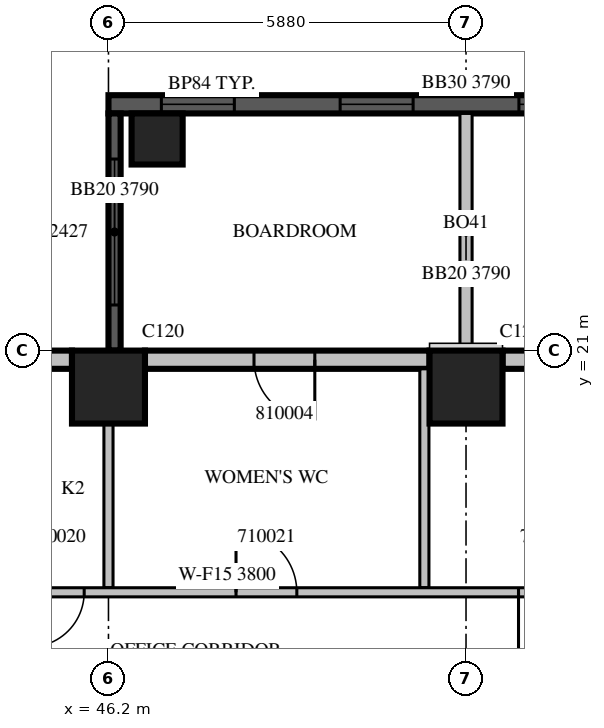
"""IFC4 building model, lengths in metres.
Left out: names, types, materials, properties, quantities, classifications, styles, units other than length and angle.
Written with IfcOpenShell. Run it as: python <this file> out.ifc"""

import sys

from ifc_helpers import new_model, si_unit, direction, frame, frame_2d, origin, origin_2d, place, context, subcontext, project, spatial, rectangle, extrude, source, transform, mapped, element, fill, save


model = new_model("IFC4")
c1 = context("Model", 3, precision=1e-05, world=origin(), true_north=direction((0.0, 1.0)))
c2 = subcontext(c1, "Body", "Model", "MODEL_VIEW")
j1 = project(units=[si_unit("LENGTHUNIT", "METRE"), si_unit("PLANEANGLEUNIT", "RADIAN")], contexts=[c1])
p1 = place(None, origin())
s1 = spatial("IfcSite", under=j1, at=p1, CompositionType="ELEMENT")
p2 = place(p1, origin())
s2 = spatial("IfcBuilding", under=s1, at=p2, CompositionType="ELEMENT")
p3 = place(p2, frame((0.0, 0.0, 53.1)))
s3 = spatial("IfcBuildingStorey", under=s2, at=p3, CompositionType="ELEMENT", Elevation=53.1)
m1 = source(origin(), c2, "Body", "SweptSolid", [
    extrude(rectangle(XDim=1.2, YDim=1.2, at=origin_2d()), origin(), (0.0, 0.0, 1.0), 4.2),
])
for number, where, z_axis, x_axis in (
    (1, (46.2, 20.4, 0.0), (0.0, 0.0, 1.0), (1.0, 0.0, 0.0)),
    (2, (52.08, 20.4, 0.0), (0.0, 0.0, 1.0), (1.0, 0.0, 0.0)),
):
    element("IfcColumn", number, at=place(p3, frame(where, z_axis=z_axis, x_axis=x_axis)), inside=s3, PredefinedType="COLUMN", context=c2, shape_type="MappedRepresentation", body=[
        mapped(m1, transform((0.0, 0.0, 0.0), scale=1.0)),
    ])
p4 = place(p3, frame((47.0, 24.48, 0.0), z_axis=(0.0, 0.0, 1.0), x_axis=(1.0, 0.0, 0.0)))
e3 = element("IfcColumn", 3, at=p4, inside=s3, PredefinedType="COLUMN", context=c2, shape_type="SweptSolid", body=[
    extrude(rectangle(XDim=0.84, YDim=0.84, at=origin_2d()), origin(), (0.0, 0.0, 1.0), 4.2),
])
m2 = source(origin(), c2, "Body", "SweptSolid", [
    extrude(rectangle(XDim=11.76, YDim=0.3, at=frame_2d((5.88, 0.0))), origin(), (0.0, 0.0, 1.0), 3.79),
])
p5 = place(p3, frame((57.96, 25.05, 0.0), z_axis=(0.0, 0.0, 1.0), x_axis=(-1.0, 0.0, 0.0)))
e4 = element("IfcWall", 4, at=p5, inside=s3, PredefinedType="SOLIDWALL", context=c2, shape_type="MappedRepresentation", body=[
    mapped(m2, transform((0.0, 0.0, 0.0), scale=1.0)),
])
m3 = source(origin(), c2, "Body", "SweptSolid", [
    extrude(rectangle(XDim=1.2, YDim=2.7, at=frame_2d((0.6, 1.35))), frame((0.0, 0.16, 0.0), z_axis=(0.0, -1.0, 0.0), x_axis=(1.0, 0.0, 0.0)), (0.0, 0.0, 1.0), 0.32),
])
p6 = place(p5, frame((0.87, 0.0, 0.6)))
e5 = element("IfcOpeningElement", 5, at=p6, cuts=e4, PredefinedType="OPENING", context=c2, shape_type="MappedRepresentation", body=[
    mapped(m3, transform((0.0, 0.0, 0.0), scale=1.0)),
])
p7 = place(p5, frame((3.81, 0.0, 0.6)))
e6 = element("IfcOpeningElement", 6, at=p7, cuts=e4, PredefinedType="OPENING", context=c2, shape_type="MappedRepresentation", body=[
    mapped(m3, transform((0.0, 0.0, 0.0), scale=1.0)),
])
p8 = place(p5, frame((6.75, 0.0, 0.6)))
e7 = element("IfcOpeningElement", 7, at=p8, cuts=e4, PredefinedType="OPENING", context=c2, shape_type="MappedRepresentation", body=[
    mapped(m3, transform((0.0, 0.0, 0.0), scale=1.0)),
])
p9 = place(p5, frame((9.69, 0.0, 0.6)))
e8 = element("IfcOpeningElement", 8, at=p9, cuts=e4, PredefinedType="OPENING", context=c2, shape_type="MappedRepresentation", body=[
    mapped(m3, transform((0.0, 0.0, 0.0), scale=1.0)),
])
m4 = source(origin(), c2, "Body", "SweptSolid", [
    extrude(rectangle(XDim=3.9, YDim=0.2, at=frame_2d((1.95, 0.0))), origin(), (0.0, 0.0, 1.0), 3.79),
])
p10 = place(p3, frame((52.08, 21.0, 0.0), z_axis=(0.0, 0.0, 1.0), x_axis=(0.0, 1.0, 0.0)))
e9 = element("IfcWall", 9, at=p10, inside=s3, PredefinedType="SOLIDWALL", context=c2, shape_type="MappedRepresentation", body=[
    mapped(m4, transform((0.0, 0.0, 0.0), scale=1.0)),
])
m5 = source(origin(), c2, "Body", "SweptSolid", [
    extrude(rectangle(XDim=3.9, YDim=0.2, at=frame_2d((1.95, 0.0))), origin(), (0.0, 0.0, 1.0), 3.79),
])
p11 = place(p3, frame((46.3, 21.0, 0.0), z_axis=(0.0, 0.0, 1.0), x_axis=(0.0, 1.0, 0.0)))
e10 = element("IfcWall", 10, at=p11, inside=s3, PredefinedType="SOLIDWALL", context=c2, shape_type="MappedRepresentation", body=[
    mapped(m5, transform((0.0, 0.0, 0.0), scale=1.0)),
])
m6 = source(origin(), c2, "Body", "SweptSolid", [
    extrude(rectangle(XDim=2.4, YDim=2.7, at=frame_2d((1.2, 1.35))), frame((0.0, 0.11, 0.0), z_axis=(0.0, -1.0, 0.0), x_axis=(1.0, 0.0, 0.0)), (0.0, 0.0, 1.0), 0.22),
])
p12 = place(p11, frame((0.75, 0.0, 0.6)))
e11 = element("IfcOpeningElement", 11, at=p12, cuts=e10, PredefinedType="OPENING", context=c2, shape_type="MappedRepresentation", body=[
    mapped(m6, transform((0.0, 0.0, 0.0), scale=1.0)),
])
m7 = source(origin(), c2, "Body", "SweptSolid", [
    extrude(rectangle(XDim=4.68, YDim=0.3, at=frame_2d((2.34, 0.0))), origin(), (0.0, 0.0, 1.0), 3.8),
])
p13 = place(p3, frame((57.36, 20.85, 0.0), z_axis=(0.0, 0.0, 1.0), x_axis=(-1.0, 0.0, 0.0)))
e12 = element("IfcWall", 12, at=p13, inside=s3, PredefinedType="STANDARD", context=c2, shape_type="MappedRepresentation", body=[
    mapped(m7, transform((0.0, 0.0, 0.0), scale=1.0)),
])
m8 = source(origin(), c2, "Body", "SweptSolid", [
    extrude(rectangle(XDim=1.0, YDim=2.1, at=frame_2d((0.5, 1.05))), frame((0.0, 0.16, 0.0), z_axis=(0.0, -1.0, 0.0), x_axis=(1.0, 0.0, 0.0)), (0.0, 0.0, 1.0), 0.32),
])
p14 = place(p13, frame((3.287, 0.0, 0.0)))
e13 = element("IfcOpeningElement", 13, at=p14, cuts=e12, PredefinedType="OPENING", context=c2, shape_type="MappedRepresentation", body=[
    mapped(m8, transform((0.0, 0.0, 0.0), scale=1.0)),
])
p15 = place(p3, frame((51.48, 20.85, 0.0), z_axis=(0.0, 0.0, 1.0), x_axis=(-1.0, 0.0, 0.0)))
e14 = element("IfcWall", 14, at=p15, inside=s3, PredefinedType="STANDARD", context=c2, shape_type="MappedRepresentation", body=[
    mapped(m7, transform((0.0, 0.0, 0.0), scale=1.0)),
])
p16 = place(p15, frame((1.887, 0.0, 0.0)))
e15 = element("IfcOpeningElement", 15, at=p16, cuts=e14, PredefinedType="OPENING", context=c2, shape_type="MappedRepresentation", body=[
    mapped(m8, transform((0.0, 0.0, 0.0), scale=1.0)),
])
m9 = source(origin(), c2, "Body", "SweptSolid", [
    extrude(rectangle(XDim=7.2, YDim=0.3, at=frame_2d((3.6, 0.0))), origin(), (0.0, 0.0, 1.0), 3.8),
])
p17 = place(p3, frame((45.6, 20.85, 0.0), z_axis=(0.0, 0.0, 1.0), x_axis=(-1.0, 0.0, 0.0)))
e16 = element("IfcWall", 16, at=p17, inside=s3, PredefinedType="STANDARD", context=c2, shape_type="MappedRepresentation", body=[
    mapped(m9, transform((0.0, 0.0, 0.0), scale=1.0)),
])
m10 = source(origin(), c2, "Body", "SweptSolid", [
    extrude(rectangle(XDim=1.8, YDim=2.7, at=frame_2d((0.9, 1.35))), frame((0.0, 0.16, 0.0), z_axis=(0.0, -1.0, 0.0), x_axis=(1.0, 0.0, 0.0)), (0.0, 0.0, 1.0), 0.32),
])
p18 = place(p17, frame((1.45, 0.0, 0.6)))
e17 = element("IfcOpeningElement", 17, at=p18, cuts=e16, PredefinedType="OPENING", context=c2, shape_type="MappedRepresentation", body=[
    mapped(m10, transform((0.0, 0.0, 0.0), scale=1.0)),
])
m11 = source(origin(), c2, "Body", "SweptSolid", [
    extrude(rectangle(XDim=2.4, YDim=2.7, at=frame_2d((1.2, 1.35))), frame((0.0, 0.16, 0.0), z_axis=(0.0, -1.0, 0.0), x_axis=(1.0, 0.0, 0.0)), (0.0, 0.0, 1.0), 0.32),
])
p19 = place(p17, frame((4.138, 0.0, 0.6)))
e18 = element("IfcOpeningElement", 18, at=p19, cuts=e16, PredefinedType="OPENING", context=c2, shape_type="MappedRepresentation", body=[
    mapped(m11, transform((0.0, 0.0, 0.0), scale=1.0)),
])
m12 = source(origin(), c2, "Body", "SweptSolid", [
    extrude(rectangle(XDim=3.6, YDim=0.15, at=frame_2d((1.8, 0.0))), origin(), (0.0, 0.0, 1.0), 3.8),
])
p20 = place(p3, frame((51.395, 20.7, 0.0), z_axis=(0.0, 0.0, 1.0), x_axis=(0.0, -1.0, 0.0)))
e19 = element("IfcWall", 19, at=p20, inside=s3, PredefinedType="PARTITIONING", context=c2, shape_type="MappedRepresentation", body=[
    mapped(m12, transform((0.0, 0.0, 0.0), scale=1.0)),
])
m13 = source(origin(), c2, "Body", "SweptSolid", [
    extrude(rectangle(XDim=2.701, YDim=0.15, at=frame_2d((1.351, 0.0))), origin(), (0.0, 0.0, 1.0), 3.8),
])
p21 = place(p3, frame((46.2, 17.1, 0.0), z_axis=(0.0, 0.0, 1.0), x_axis=(0.0, 1.0, 0.0)))
e20 = element("IfcWall", 20, at=p21, inside=s3, PredefinedType="PARTITIONING", context=c2, shape_type="MappedRepresentation", body=[
    mapped(m13, transform((0.0, 0.0, 0.0), scale=1.0)),
])
m14 = source(origin(), c2, "Body", "SweptSolid", [
    extrude(rectangle(XDim=37.5, YDim=0.15, at=frame_2d((18.75, 0.0))), origin(), (0.0, 0.0, 1.0), 3.8),
])
p22 = place(p3, frame((29.4, 17.025, 0.0), z_axis=(0.0, 0.0, 1.0), x_axis=(1.0, 0.0, 0.0)))
e21 = element("IfcWall", 21, at=p22, inside=s3, PredefinedType="PARTITIONING", context=c2, shape_type="MappedRepresentation", body=[
    mapped(m14, transform((0.0, 0.0, 0.0), scale=1.0)),
])
m15 = source(origin(), c2, "Body", "SweptSolid", [
    extrude(rectangle(XDim=1.0, YDim=2.1, at=frame_2d((0.5, 1.05))), frame((0.0, 0.085, 0.0), z_axis=(0.0, -1.0, 0.0), x_axis=(1.0, 0.0, 0.0)), (0.0, 0.0, 1.0), 0.17),
])
p23 = place(p22, frame((1.357, 0.0, 0.0)))
e22 = element("IfcOpeningElement", 22, at=p23, cuts=e21, PredefinedType="OPENING", context=c2, shape_type="MappedRepresentation", body=[
    mapped(m15, transform((0.0, 0.0, 0.0), scale=1.0)),
])
p24 = place(p22, frame((4.669, 0.0, 0.0)))
e23 = element("IfcOpeningElement", 23, at=p24, cuts=e21, PredefinedType="OPENING", context=c2, shape_type="MappedRepresentation", body=[
    mapped(m15, transform((0.0, 0.0, 0.0), scale=1.0)),
])
p25 = place(p22, frame((7.012, 0.0, 0.0)))
e24 = element("IfcOpeningElement", 24, at=p25, cuts=e21, PredefinedType="OPENING", context=c2, shape_type="MappedRepresentation", body=[
    mapped(m15, transform((0.0, 0.0, 0.0), scale=1.0)),
])
m16 = source(origin(), c2, "Body", "SweptSolid", [
    extrude(rectangle(XDim=0.9, YDim=2.1, at=frame_2d((0.45, 1.05))), frame((0.0, 0.085, 0.0), z_axis=(0.0, -1.0, 0.0), x_axis=(1.0, 0.0, 0.0)), (0.0, 0.0, 1.0), 0.17),
])
p26 = place(p22, frame((10.05, 0.0, 0.0)))
e25 = element("IfcOpeningElement", 25, at=p26, cuts=e21, PredefinedType="OPENING", context=c2, shape_type="MappedRepresentation", body=[
    mapped(m16, transform((0.0, 0.0, 0.0), scale=1.0)),
])
p27 = place(p22, frame((13.401, 0.0, 0.0)))
e26 = element("IfcOpeningElement", 26, at=p27, cuts=e21, PredefinedType="OPENING", context=c2, shape_type="MappedRepresentation", body=[
    mapped(m16, transform((0.0, 0.0, 0.0), scale=1.0)),
])
p28 = place(p22, frame((15.501, 0.0, 0.0)))
e27 = element("IfcOpeningElement", 27, at=p28, cuts=e21, PredefinedType="OPENING", context=c2, shape_type="MappedRepresentation", body=[
    mapped(m16, transform((0.0, 0.0, 0.0), scale=1.0)),
])
p29 = place(p22, frame((18.898, 0.0, 0.0)))
e28 = element("IfcOpeningElement", 28, at=p29, cuts=e21, PredefinedType="OPENING", context=c2, shape_type="MappedRepresentation", body=[
    mapped(m15, transform((0.0, 0.0, 0.0), scale=1.0)),
])
p30 = place(p22, frame((23.543, 0.0, 0.0)))
e29 = element("IfcOpeningElement", 29, at=p30, cuts=e21, PredefinedType="OPENING", context=c2, shape_type="MappedRepresentation", body=[
    mapped(m15, transform((0.0, 0.0, 0.0), scale=1.0)),
])
p31 = place(p22, frame((26.826, 0.0, 0.0)))
e30 = element("IfcOpeningElement", 30, at=p31, cuts=e21, PredefinedType="OPENING", context=c2, shape_type="MappedRepresentation", body=[
    mapped(m15, transform((0.0, 0.0, 0.0), scale=1.0)),
])
p32 = place(p22, frame((30.364, 0.0, 0.0)))
e31 = element("IfcOpeningElement", 31, at=p32, cuts=e21, PredefinedType="OPENING", context=c2, shape_type="MappedRepresentation", body=[
    mapped(m16, transform((0.0, 0.0, 0.0), scale=1.0)),
])
p33 = place(p22, frame((34.871, 0.0, 0.0)))
e32 = element("IfcOpeningElement", 32, at=p33, cuts=e21, PredefinedType="OPENING", context=c2, shape_type="MappedRepresentation", body=[
    mapped(m16, transform((0.0, 0.0, 0.0), scale=1.0)),
])
m17 = source(origin(), c2, "Body", "SweptSolid", [
    extrude(rectangle(XDim=1.2, YDim=2.7, at=frame_2d((0.6, 1.35))), frame((0.0, 0.03, 0.0), z_axis=(0.0, -1.0, 0.0), x_axis=(1.0, 0.0, 0.0)), (0.0, 0.0, 1.0), 0.06),
])
p34 = place(p7, origin())
e33 = element("IfcWindow", 33, at=p34, inside=s3, PartitioningType="SINGLE_PANEL", PredefinedType="WINDOW", context=c2, shape_type="MappedRepresentation", body=[
    mapped(m17, transform((0.0, 0.0, 0.0), scale=1.0)),
])
fill(e6, e33)
p35 = place(p8, origin())
e34 = element("IfcWindow", 34, at=p35, inside=s3, PartitioningType="SINGLE_PANEL", PredefinedType="WINDOW", context=c2, shape_type="MappedRepresentation", body=[
    mapped(m17, transform((0.0, 0.0, 0.0), scale=1.0)),
])
fill(e7, e34)
p36 = place(p9, origin())
e35 = element("IfcWindow", 35, at=p36, inside=s3, PartitioningType="SINGLE_PANEL", PredefinedType="WINDOW", context=c2, shape_type="MappedRepresentation", body=[
    mapped(m17, transform((0.0, 0.0, 0.0), scale=1.0)),
])
fill(e8, e35)
m18 = source(origin(), c2, "Body", "SweptSolid", [
    extrude(rectangle(XDim=2.4, YDim=2.7, at=frame_2d((1.2, 1.35))), frame((0.0, 0.03, 0.0), z_axis=(0.0, -1.0, 0.0), x_axis=(1.0, 0.0, 0.0)), (0.0, 0.0, 1.0), 0.06),
])
p37 = place(p12, origin())
e36 = element("IfcWindow", 36, at=p37, inside=s3, PartitioningType="SINGLE_PANEL", PredefinedType="WINDOW", context=c2, shape_type="MappedRepresentation", body=[
    mapped(m18, transform((0.0, 0.0, 0.0), scale=1.0)),
])
fill(e11, e36)
m19 = source(origin(), c2, "Body", "SweptSolid", [
    extrude(rectangle(XDim=0.9, YDim=2.1, at=frame_2d((0.45, 1.05))), frame((0.0, 0.025, 0.0), z_axis=(0.0, -1.0, 0.0), x_axis=(1.0, 0.0, 0.0)), (0.0, 0.0, 1.0), 0.05),
])
p38 = place(p28, origin())
e37 = element("IfcDoor", 37, at=p38, inside=s3, OperationType="SINGLE_SWING_RIGHT", PredefinedType="DOOR", context=c2, shape_type="MappedRepresentation", body=[
    mapped(m19, transform((0.0, 0.0, 0.0), scale=1.0)),
])
fill(e27, e37)
m20 = source(origin(), c2, "Body", "SweptSolid", [
    extrude(rectangle(XDim=1.0, YDim=2.1, at=frame_2d((0.5, 1.05))), frame((0.0, 0.025, 0.0), z_axis=(0.0, -1.0, 0.0), x_axis=(1.0, 0.0, 0.0)), (0.0, 0.0, 1.0), 0.05),
])
p39 = place(p29, origin())
e38 = element("IfcDoor", 38, at=p39, inside=s3, OperationType="SINGLE_SWING_LEFT", PredefinedType="DOOR", context=c2, shape_type="MappedRepresentation", body=[
    mapped(m20, transform((0.0, 0.0, 0.0), scale=1.0)),
])
fill(e28, e38)
p40 = place(p30, origin())
e39 = element("IfcDoor", 39, at=p40, inside=s3, OperationType="SINGLE_SWING_RIGHT", PredefinedType="DOOR", context=c2, shape_type="MappedRepresentation", body=[
    mapped(m20, transform((0.0, 0.0, 0.0), scale=1.0)),
])
fill(e29, e39)
p41 = place(p16, origin())
e40 = element("IfcDoor", 40, at=p41, inside=s3, OperationType="SINGLE_SWING_LEFT", PredefinedType="DOOR", context=c2, shape_type="MappedRepresentation", body=[
    mapped(m20, transform((0.0, 0.0, 0.0), scale=1.0)),
])
fill(e15, e40)
save(model, sys.argv[1])
